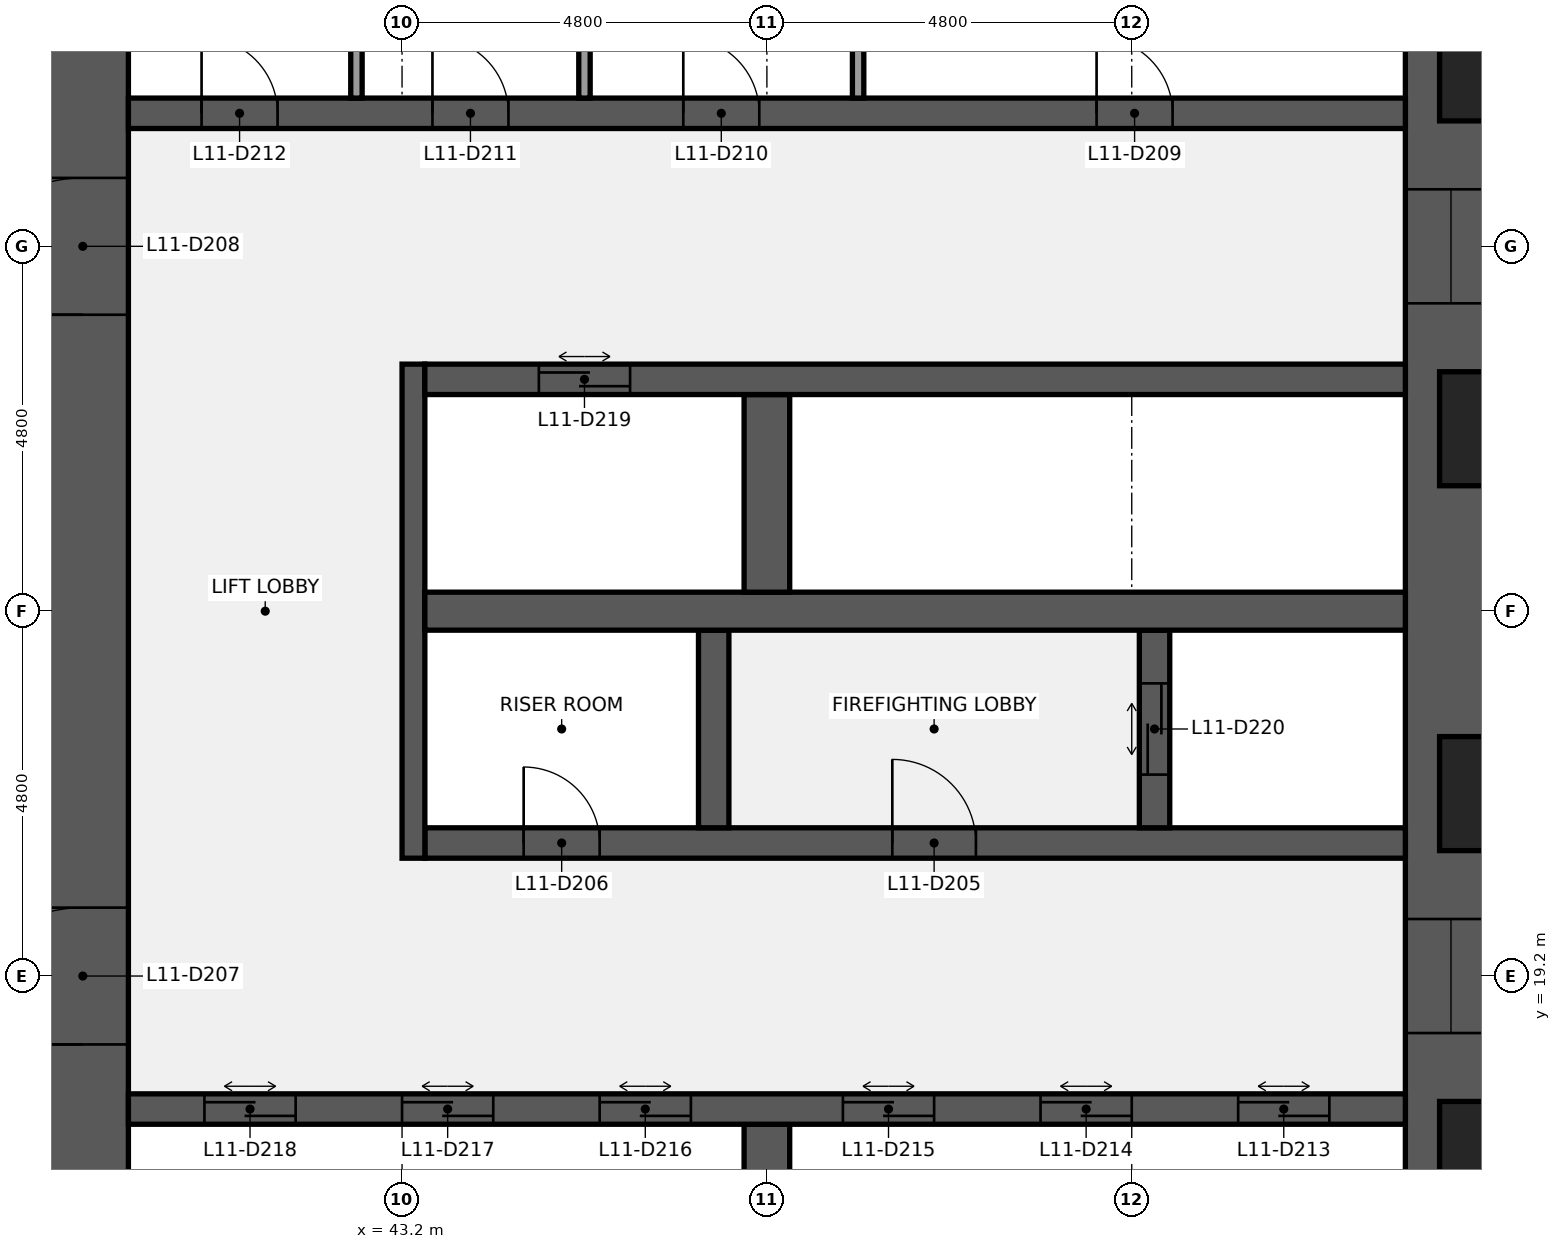
"""IFC4 building model, lengths in metres.
Left out: names, types, materials, properties, quantities, classifications, styles, units other than length and angle.
Written with IfcOpenShell. Run it as: python <this file> out.ifc"""

import sys

from ifc_helpers import new_model, si_unit, direction, frame, frame_2d, origin, place, context, subcontext, project, spatial, rectangle, extrude, element, fill, save


model = new_model("IFC4")
c1 = context("Model", 3, precision=1e-05, world=origin(), true_north=direction((0.0, 1.0)))
c2 = subcontext(c1, "Body", "Model", "MODEL_VIEW")
j1 = project(units=[si_unit("LENGTHUNIT", "METRE"), si_unit("PLANEANGLEUNIT", "RADIAN")], contexts=[c1])
p1 = place(None, origin())
s1 = spatial("IfcSite", under=j1, at=p1, CompositionType="ELEMENT")
p2 = place(p1, origin())
s2 = spatial("IfcBuilding", under=s1, at=p2, CompositionType="ELEMENT")
p3 = place(p2, frame((0.0, 0.0, 55.0)))
s3 = spatial("IfcBuildingStorey", under=s2, at=p3, CompositionType="ELEMENT", Elevation=55.0)
p4 = place(p3, frame((57.0, 38.4, 0.0), z_axis=(0.0, 0.0, 1.0), x_axis=(0.0, -1.0, 0.0)))
e1 = element("IfcWall", 1, at=p4, inside=s3, PredefinedType="SHEAR", context=c2, shape_type="SweptSolid", body=[
    extrude(rectangle(XDim=28.8, YDim=1.2, at=frame_2d((14.4, 0.0))), origin(), (0.0, 0.0, 1.0), 3.84),
])
p5 = place(p4, frame((18.45, 0.0, 0.9)))
e2 = element("IfcOpeningElement", 2, at=p5, cuts=e1, PredefinedType="OPENING", context=c2, shape_type="SweptSolid", body=[
    extrude(rectangle(XDim=1.5, YDim=1.5, at=frame_2d((0.75, 0.75))), frame((0.0, 0.61, 0.0), z_axis=(0.0, -1.0, 0.0), x_axis=(1.0, 0.0, 0.0)), (0.0, 0.0, 1.0), 1.22),
])
p6 = place(p4, frame((8.85, 0.0, 0.9)))
e3 = element("IfcOpeningElement", 3, at=p6, cuts=e1, PredefinedType="OPENING", context=c2, shape_type="SweptSolid", body=[
    extrude(rectangle(XDim=1.5, YDim=1.5, at=frame_2d((0.75, 0.75))), frame((0.0, 0.61, 0.0), z_axis=(0.0, -1.0, 0.0), x_axis=(1.0, 0.0, 0.0)), (0.0, 0.0, 1.0), 1.22),
])
p7 = place(p3, frame((39.0, 9.6, 0.0), z_axis=(0.0, 0.0, 1.0), x_axis=(0.0, 1.0, 0.0)))
e4 = element("IfcWall", 4, at=p7, inside=s3, PredefinedType="SHEAR", context=c2, shape_type="SweptSolid", body=[
    extrude(rectangle(XDim=28.8, YDim=1.2, at=frame_2d((14.4, 0.0))), origin(), (0.0, 0.0, 1.0), 3.84),
])
p8 = place(p7, frame((8.7, 0.0, 0.0)))
e5 = element("IfcOpeningElement", 5, at=p8, cuts=e4, PredefinedType="OPENING", context=c2, shape_type="SweptSolid", body=[
    extrude(rectangle(XDim=1.8, YDim=2.1, at=frame_2d((0.9, 1.05))), frame((0.0, 0.61, 0.0), z_axis=(0.0, -1.0, 0.0), x_axis=(1.0, 0.0, 0.0)), (0.0, 0.0, 1.0), 1.22),
])
p9 = place(p7, frame((18.3, 0.0, 0.0)))
e6 = element("IfcOpeningElement", 6, at=p9, cuts=e4, PredefinedType="OPENING", context=c2, shape_type="SweptSolid", body=[
    extrude(rectangle(XDim=1.8, YDim=2.1, at=frame_2d((0.9, 1.05))), frame((0.0, 0.61, 0.0), z_axis=(0.0, -1.0, 0.0), x_axis=(1.0, 0.0, 0.0)), (0.0, 0.0, 1.0), 1.22),
])
p10 = place(p3, frame((48.0, 14.65, 0.0), z_axis=(0.0, 0.0, 1.0), x_axis=(0.0, 1.0, 0.0)))
e7 = element("IfcWall", 7, at=p10, inside=s3, PredefinedType="SHEAR", context=c2, shape_type="SweptSolid", body=[
    extrude(rectangle(XDim=2.6, YDim=0.6, at=frame_2d((1.3, 0.0))), origin(), (0.0, 0.0, 1.0), 3.84),
])
p11 = place(p3, frame((39.6, 17.45, 0.0), z_axis=(0.0, 0.0, 1.0), x_axis=(1.0, 0.0, 0.0)))
e8 = element("IfcWall", 8, at=p11, inside=s3, PredefinedType="SHEAR", context=c2, shape_type="SweptSolid", body=[
    extrude(rectangle(XDim=16.8, YDim=0.4, at=frame_2d((8.4, 0.0))), origin(), (0.0, 0.0, 1.0), 3.84),
])
p12 = place(p11, frame((14.6, 0.0, 0.0)))
e9 = element("IfcOpeningElement", 9, at=p12, cuts=e8, PredefinedType="OPENING", context=c2, shape_type="SweptSolid", body=[
    extrude(rectangle(XDim=1.2, YDim=2.1, at=frame_2d((0.6, 1.05))), frame((0.0, 0.21, 0.0), z_axis=(0.0, -1.0, 0.0), x_axis=(1.0, 0.0, 0.0)), (0.0, 0.0, 1.0), 0.42),
])
p13 = place(p11, frame((12.0, 0.0, 0.0)))
e10 = element("IfcOpeningElement", 10, at=p13, cuts=e8, PredefinedType="OPENING", context=c2, shape_type="SweptSolid", body=[
    extrude(rectangle(XDim=1.2, YDim=2.1, at=frame_2d((0.6, 1.05))), frame((0.0, 0.21, 0.0), z_axis=(0.0, -1.0, 0.0), x_axis=(1.0, 0.0, 0.0)), (0.0, 0.0, 1.0), 0.42),
])
p14 = place(p11, frame((9.4, 0.0, 0.0)))
e11 = element("IfcOpeningElement", 11, at=p14, cuts=e8, PredefinedType="OPENING", context=c2, shape_type="SweptSolid", body=[
    extrude(rectangle(XDim=1.2, YDim=2.1, at=frame_2d((0.6, 1.05))), frame((0.0, 0.21, 0.0), z_axis=(0.0, -1.0, 0.0), x_axis=(1.0, 0.0, 0.0)), (0.0, 0.0, 1.0), 0.42),
])
p15 = place(p11, frame((6.2, 0.0, 0.0)))
e12 = element("IfcOpeningElement", 12, at=p15, cuts=e8, PredefinedType="OPENING", context=c2, shape_type="SweptSolid", body=[
    extrude(rectangle(XDim=1.2, YDim=2.1, at=frame_2d((0.6, 1.05))), frame((0.0, 0.21, 0.0), z_axis=(0.0, -1.0, 0.0), x_axis=(1.0, 0.0, 0.0)), (0.0, 0.0, 1.0), 0.42),
])
p16 = place(p11, frame((3.6, 0.0, 0.0)))
e13 = element("IfcOpeningElement", 13, at=p16, cuts=e8, PredefinedType="OPENING", context=c2, shape_type="SweptSolid", body=[
    extrude(rectangle(XDim=1.2, YDim=2.1, at=frame_2d((0.6, 1.05))), frame((0.0, 0.21, 0.0), z_axis=(0.0, -1.0, 0.0), x_axis=(1.0, 0.0, 0.0)), (0.0, 0.0, 1.0), 0.42),
])
p17 = place(p11, frame((1.0, 0.0, 0.0)))
e14 = element("IfcOpeningElement", 14, at=p17, cuts=e8, PredefinedType="OPENING", context=c2, shape_type="SweptSolid", body=[
    extrude(rectangle(XDim=1.2, YDim=2.1, at=frame_2d((0.6, 1.05))), frame((0.0, 0.21, 0.0), z_axis=(0.0, -1.0, 0.0), x_axis=(1.0, 0.0, 0.0)), (0.0, 0.0, 1.0), 0.42),
])
p18 = place(p3, frame((43.5, 20.95, 0.0), z_axis=(0.0, 0.0, 1.0), x_axis=(1.0, 0.0, 0.0)))
e15 = element("IfcWall", 15, at=p18, inside=s3, PredefinedType="SHEAR", context=c2, shape_type="SweptSolid", body=[
    extrude(rectangle(XDim=12.9, YDim=0.4, at=frame_2d((6.45, 0.0))), origin(), (0.0, 0.0, 1.0), 3.84),
])
p19 = place(p18, frame((6.15, 0.0, 0.0)))
e16 = element("IfcOpeningElement", 16, at=p19, cuts=e15, PredefinedType="OPENING", context=c2, shape_type="SweptSolid", body=[
    extrude(rectangle(XDim=1.1, YDim=2.1, at=frame_2d((0.55, 1.05))), frame((0.0, 0.21, 0.0), z_axis=(0.0, -1.0, 0.0), x_axis=(1.0, 0.0, 0.0)), (0.0, 0.0, 1.0), 0.42),
])
p20 = place(p18, frame((1.3, 0.0, 0.0)))
e17 = element("IfcOpeningElement", 17, at=p20, cuts=e15, PredefinedType="OPENING", context=c2, shape_type="SweptSolid", body=[
    extrude(rectangle(XDim=1.0, YDim=2.1, at=frame_2d((0.5, 1.05))), frame((0.0, 0.21, 0.0), z_axis=(0.0, -1.0, 0.0), x_axis=(1.0, 0.0, 0.0)), (0.0, 0.0, 1.0), 0.42),
])
p21 = place(p3, frame((43.35, 20.75, 0.0), z_axis=(0.0, 0.0, 1.0), x_axis=(0.0, 1.0, 0.0)))
e18 = element("IfcWall", 18, at=p21, inside=s3, PredefinedType="SHEAR", context=c2, shape_type="SweptSolid", body=[
    extrude(rectangle(XDim=6.5, YDim=0.3, at=frame_2d((3.25, 0.0))), origin(), (0.0, 0.0, 1.0), 3.84),
])
p22 = place(p3, frame((53.1, 21.15, 0.0), z_axis=(0.0, 0.0, 1.0), x_axis=(0.0, 1.0, 0.0)))
e19 = element("IfcWall", 19, at=p22, inside=s3, PredefinedType="SHEAR", context=c2, shape_type="SweptSolid", body=[
    extrude(rectangle(XDim=2.6, YDim=0.4, at=frame_2d((1.3, 0.0))), origin(), (0.0, 0.0, 1.0), 3.84),
])
p23 = place(p22, frame((0.7, 0.0, 0.0)))
e20 = element("IfcOpeningElement", 20, at=p23, cuts=e19, PredefinedType="OPENING", context=c2, shape_type="SweptSolid", body=[
    extrude(rectangle(XDim=1.2, YDim=2.1, at=frame_2d((0.6, 1.05))), frame((0.0, 0.21, 0.0), z_axis=(0.0, -1.0, 0.0), x_axis=(1.0, 0.0, 0.0)), (0.0, 0.0, 1.0), 0.42),
])
p24 = place(p3, frame((47.3, 21.15, 0.0), z_axis=(0.0, 0.0, 1.0), x_axis=(0.0, 1.0, 0.0)))
e21 = element("IfcWall", 21, at=p24, inside=s3, PredefinedType="SHEAR", context=c2, shape_type="SweptSolid", body=[
    extrude(rectangle(XDim=2.6, YDim=0.4, at=frame_2d((1.3, 0.0))), origin(), (0.0, 0.0, 1.0), 3.84),
])
p25 = place(p3, frame((43.5, 24.0, 0.0), z_axis=(0.0, 0.0, 1.0), x_axis=(1.0, 0.0, 0.0)))
e22 = element("IfcWall", 22, at=p25, inside=s3, PredefinedType="SHEAR", context=c2, shape_type="SweptSolid", body=[
    extrude(rectangle(XDim=12.9, YDim=0.5, at=frame_2d((6.45, 0.0))), origin(), (0.0, 0.0, 1.0), 3.84),
])
p26 = place(p3, frame((48.0, 24.25, 0.0), z_axis=(0.0, 0.0, 1.0), x_axis=(0.0, 1.0, 0.0)))
e23 = element("IfcWall", 23, at=p26, inside=s3, PredefinedType="SHEAR", context=c2, shape_type="SweptSolid", body=[
    extrude(rectangle(XDim=2.6, YDim=0.6, at=frame_2d((1.3, 0.0))), origin(), (0.0, 0.0, 1.0), 3.84),
])
p27 = place(p3, frame((43.5, 27.05, 0.0), z_axis=(0.0, 0.0, 1.0), x_axis=(1.0, 0.0, 0.0)))
e24 = element("IfcWall", 24, at=p27, inside=s3, PredefinedType="SHEAR", context=c2, shape_type="SweptSolid", body=[
    extrude(rectangle(XDim=12.9, YDim=0.4, at=frame_2d((6.45, 0.0))), origin(), (0.0, 0.0, 1.0), 3.84),
])
p28 = place(p27, frame((1.5, 0.0, 0.0)))
e25 = element("IfcOpeningElement", 25, at=p28, cuts=e24, PredefinedType="OPENING", context=c2, shape_type="SweptSolid", body=[
    extrude(rectangle(XDim=1.2, YDim=2.1, at=frame_2d((0.6, 1.05))), frame((0.0, 0.21, 0.0), z_axis=(0.0, -1.0, 0.0), x_axis=(1.0, 0.0, 0.0)), (0.0, 0.0, 1.0), 0.42),
])
p29 = place(p3, frame((39.6, 30.55, 0.0), z_axis=(0.0, 0.0, 1.0), x_axis=(1.0, 0.0, 0.0)))
e26 = element("IfcWall", 26, at=p29, inside=s3, PredefinedType="SHEAR", context=c2, shape_type="SweptSolid", body=[
    extrude(rectangle(XDim=16.8, YDim=0.4, at=frame_2d((8.4, 0.0))), origin(), (0.0, 0.0, 1.0), 3.84),
])
p30 = place(p29, frame((12.738, 0.0, 0.0)))
e27 = element("IfcOpeningElement", 27, at=p30, cuts=e26, PredefinedType="OPENING", context=c2, shape_type="SweptSolid", body=[
    extrude(rectangle(XDim=1.0, YDim=2.1, at=frame_2d((0.5, 1.05))), frame((0.0, 0.21, 0.0), z_axis=(0.0, -1.0, 0.0), x_axis=(1.0, 0.0, 0.0)), (0.0, 0.0, 1.0), 0.42),
])
p31 = place(p29, frame((7.3, 0.0, 0.0)))
e28 = element("IfcOpeningElement", 28, at=p31, cuts=e26, PredefinedType="OPENING", context=c2, shape_type="SweptSolid", body=[
    extrude(rectangle(XDim=1.0, YDim=2.1, at=frame_2d((0.5, 1.05))), frame((0.0, 0.21, 0.0), z_axis=(0.0, -1.0, 0.0), x_axis=(1.0, 0.0, 0.0)), (0.0, 0.0, 1.0), 0.42),
])
p32 = place(p29, frame((4.0, 0.0, 0.0)))
e29 = element("IfcOpeningElement", 29, at=p32, cuts=e26, PredefinedType="OPENING", context=c2, shape_type="SweptSolid", body=[
    extrude(rectangle(XDim=1.0, YDim=2.1, at=frame_2d((0.5, 1.05))), frame((0.0, 0.21, 0.0), z_axis=(0.0, -1.0, 0.0), x_axis=(1.0, 0.0, 0.0)), (0.0, 0.0, 1.0), 0.42),
])
p33 = place(p29, frame((0.962, 0.0, 0.0)))
e30 = element("IfcOpeningElement", 30, at=p33, cuts=e26, PredefinedType="OPENING", context=c2, shape_type="SweptSolid", body=[
    extrude(rectangle(XDim=1.0, YDim=2.1, at=frame_2d((0.5, 1.05))), frame((0.0, 0.21, 0.0), z_axis=(0.0, -1.0, 0.0), x_axis=(1.0, 0.0, 0.0)), (0.0, 0.0, 1.0), 0.42),
])
for number, where, z_axis, x_axis in (
    (31, (49.2, 30.75, 0.0), (0.0, 0.0, 1.0), (0.0, 1.0, 0.0)),
    (32, (45.6, 30.75, 0.0), (0.0, 0.0, 1.0), (0.0, 1.0, 0.0)),
    (33, (42.6, 30.75, 0.0), (0.0, 0.0, 1.0), (0.0, 1.0, 0.0)),
):
    element("IfcWall", number, at=place(p3, frame(where, z_axis=z_axis, x_axis=x_axis)), inside=s3, PredefinedType="PARTITIONING", context=c2, shape_type="SweptSolid", body=[
        extrude(rectangle(XDim=2.6, YDim=0.15, at=frame_2d((1.3, 0.0))), origin(), (0.0, 0.0, 1.0), 3.84),
    ])
p34 = place(p19, origin())
e34 = element("IfcDoor", 34, at=p34, inside=s3, OperationType="SINGLE_SWING_LEFT", PredefinedType="DOOR", context=c2, shape_type="SweptSolid", body=[
    extrude(rectangle(XDim=1.1, YDim=2.1, at=frame_2d((0.55, 1.05))), frame((0.0, 0.025, 0.0), z_axis=(0.0, -1.0, 0.0), x_axis=(1.0, 0.0, 0.0)), (0.0, 0.0, 1.0), 0.05),
])
fill(e16, e34)
p35 = place(p20, origin())
e35 = element("IfcDoor", 35, at=p35, inside=s3, OperationType="SINGLE_SWING_LEFT", PredefinedType="DOOR", context=c2, shape_type="SweptSolid", body=[
    extrude(rectangle(XDim=1.0, YDim=2.1, at=frame_2d((0.5, 1.05))), frame((0.0, 0.025, 0.0), z_axis=(0.0, -1.0, 0.0), x_axis=(1.0, 0.0, 0.0)), (0.0, 0.0, 1.0), 0.05),
])
fill(e17, e35)
p36 = place(p8, origin())
e36 = element("IfcDoor", 36, at=p36, inside=s3, OperationType="DOUBLE_DOOR_SINGLE_SWING", PredefinedType="DOOR", context=c2, shape_type="SweptSolid", body=[
    extrude(rectangle(XDim=1.8, YDim=2.1, at=frame_2d((0.9, 1.05))), frame((0.0, 0.025, 0.0), z_axis=(0.0, -1.0, 0.0), x_axis=(1.0, 0.0, 0.0)), (0.0, 0.0, 1.0), 0.05),
])
fill(e5, e36)
p37 = place(p9, origin())
e37 = element("IfcDoor", 37, at=p37, inside=s3, OperationType="DOUBLE_DOOR_SINGLE_SWING", PredefinedType="DOOR", context=c2, shape_type="SweptSolid", body=[
    extrude(rectangle(XDim=1.8, YDim=2.1, at=frame_2d((0.9, 1.05))), frame((0.0, 0.025, 0.0), z_axis=(0.0, -1.0, 0.0), x_axis=(1.0, 0.0, 0.0)), (0.0, 0.0, 1.0), 0.05),
])
fill(e6, e37)
p38 = place(p30, origin())
e38 = element("IfcDoor", 38, at=p38, inside=s3, OperationType="SINGLE_SWING_LEFT", PredefinedType="DOOR", context=c2, shape_type="SweptSolid", body=[
    extrude(rectangle(XDim=1.0, YDim=2.1, at=frame_2d((0.5, 1.05))), frame((0.0, 0.025, 0.0), z_axis=(0.0, -1.0, 0.0), x_axis=(1.0, 0.0, 0.0)), (0.0, 0.0, 1.0), 0.05),
])
fill(e27, e38)
p39 = place(p31, origin())
e39 = element("IfcDoor", 39, at=p39, inside=s3, OperationType="SINGLE_SWING_LEFT", PredefinedType="DOOR", context=c2, shape_type="SweptSolid", body=[
    extrude(rectangle(XDim=1.0, YDim=2.1, at=frame_2d((0.5, 1.05))), frame((0.0, 0.025, 0.0), z_axis=(0.0, -1.0, 0.0), x_axis=(1.0, 0.0, 0.0)), (0.0, 0.0, 1.0), 0.05),
])
fill(e28, e39)
p40 = place(p32, origin())
e40 = element("IfcDoor", 40, at=p40, inside=s3, OperationType="SINGLE_SWING_LEFT", PredefinedType="DOOR", context=c2, shape_type="SweptSolid", body=[
    extrude(rectangle(XDim=1.0, YDim=2.1, at=frame_2d((0.5, 1.05))), frame((0.0, 0.025, 0.0), z_axis=(0.0, -1.0, 0.0), x_axis=(1.0, 0.0, 0.0)), (0.0, 0.0, 1.0), 0.05),
])
fill(e29, e40)
p41 = place(p33, origin())
e41 = element("IfcDoor", 41, at=p41, inside=s3, OperationType="SINGLE_SWING_LEFT", PredefinedType="DOOR", context=c2, shape_type="SweptSolid", body=[
    extrude(rectangle(XDim=1.0, YDim=2.1, at=frame_2d((0.5, 1.05))), frame((0.0, 0.025, 0.0), z_axis=(0.0, -1.0, 0.0), x_axis=(1.0, 0.0, 0.0)), (0.0, 0.0, 1.0), 0.05),
])
fill(e30, e41)
p42 = place(p12, origin())
e42 = element("IfcDoor", 42, at=p42, inside=s3, OperationType="DOUBLE_DOOR_SLIDING", PredefinedType="DOOR", context=c2, shape_type="SweptSolid", body=[
    extrude(rectangle(XDim=1.2, YDim=2.1, at=frame_2d((0.6, 1.05))), frame((0.0, 0.025, 0.0), z_axis=(0.0, -1.0, 0.0), x_axis=(1.0, 0.0, 0.0)), (0.0, 0.0, 1.0), 0.05),
])
fill(e9, e42)
p43 = place(p13, origin())
e43 = element("IfcDoor", 43, at=p43, inside=s3, OperationType="DOUBLE_DOOR_SLIDING", PredefinedType="DOOR", context=c2, shape_type="SweptSolid", body=[
    extrude(rectangle(XDim=1.2, YDim=2.1, at=frame_2d((0.6, 1.05))), frame((0.0, 0.025, 0.0), z_axis=(0.0, -1.0, 0.0), x_axis=(1.0, 0.0, 0.0)), (0.0, 0.0, 1.0), 0.05),
])
fill(e10, e43)
p44 = place(p14, origin())
e44 = element("IfcDoor", 44, at=p44, inside=s3, OperationType="DOUBLE_DOOR_SLIDING", PredefinedType="DOOR", context=c2, shape_type="SweptSolid", body=[
    extrude(rectangle(XDim=1.2, YDim=2.1, at=frame_2d((0.6, 1.05))), frame((0.0, 0.025, 0.0), z_axis=(0.0, -1.0, 0.0), x_axis=(1.0, 0.0, 0.0)), (0.0, 0.0, 1.0), 0.05),
])
fill(e11, e44)
p45 = place(p15, origin())
e45 = element("IfcDoor", 45, at=p45, inside=s3, OperationType="DOUBLE_DOOR_SLIDING", PredefinedType="DOOR", context=c2, shape_type="SweptSolid", body=[
    extrude(rectangle(XDim=1.2, YDim=2.1, at=frame_2d((0.6, 1.05))), frame((0.0, 0.025, 0.0), z_axis=(0.0, -1.0, 0.0), x_axis=(1.0, 0.0, 0.0)), (0.0, 0.0, 1.0), 0.05),
])
fill(e12, e45)
p46 = place(p16, origin())
e46 = element("IfcDoor", 46, at=p46, inside=s3, OperationType="DOUBLE_DOOR_SLIDING", PredefinedType="DOOR", context=c2, shape_type="SweptSolid", body=[
    extrude(rectangle(XDim=1.2, YDim=2.1, at=frame_2d((0.6, 1.05))), frame((0.0, 0.025, 0.0), z_axis=(0.0, -1.0, 0.0), x_axis=(1.0, 0.0, 0.0)), (0.0, 0.0, 1.0), 0.05),
])
fill(e13, e46)
p47 = place(p17, origin())
e47 = element("IfcDoor", 47, at=p47, inside=s3, OperationType="DOUBLE_DOOR_SLIDING", PredefinedType="DOOR", context=c2, shape_type="SweptSolid", body=[
    extrude(rectangle(XDim=1.2, YDim=2.1, at=frame_2d((0.6, 1.05))), frame((0.0, 0.025, 0.0), z_axis=(0.0, -1.0, 0.0), x_axis=(1.0, 0.0, 0.0)), (0.0, 0.0, 1.0), 0.05),
])
fill(e14, e47)
p48 = place(p28, origin())
e48 = element("IfcDoor", 48, at=p48, inside=s3, OperationType="DOUBLE_DOOR_SLIDING", PredefinedType="DOOR", context=c2, shape_type="SweptSolid", body=[
    extrude(rectangle(XDim=1.2, YDim=2.1, at=frame_2d((0.6, 1.05))), frame((0.0, 0.025, 0.0), z_axis=(0.0, -1.0, 0.0), x_axis=(1.0, 0.0, 0.0)), (0.0, 0.0, 1.0), 0.05),
])
fill(e25, e48)
p49 = place(p23, origin())
e49 = element("IfcDoor", 49, at=p49, inside=s3, OperationType="DOUBLE_DOOR_SLIDING", PredefinedType="DOOR", context=c2, shape_type="SweptSolid", body=[
    extrude(rectangle(XDim=1.2, YDim=2.1, at=frame_2d((0.6, 1.05))), frame((0.0, 0.025, 0.0), z_axis=(0.0, -1.0, 0.0), x_axis=(1.0, 0.0, 0.0)), (0.0, 0.0, 1.0), 0.05),
])
fill(e20, e49)
p50 = place(p5, origin())
e50 = element("IfcWindow", 50, at=p50, inside=s3, PartitioningType="SINGLE_PANEL", PredefinedType="WINDOW", context=c2, shape_type="SweptSolid", body=[
    extrude(rectangle(XDim=1.5, YDim=1.5, at=frame_2d((0.75, 0.75))), frame((0.0, 0.03, 0.0), z_axis=(0.0, -1.0, 0.0), x_axis=(1.0, 0.0, 0.0)), (0.0, 0.0, 1.0), 0.06),
])
fill(e2, e50)
p51 = place(p6, origin())
e51 = element("IfcWindow", 51, at=p51, inside=s3, PartitioningType="SINGLE_PANEL", PredefinedType="WINDOW", context=c2, shape_type="SweptSolid", body=[
    extrude(rectangle(XDim=1.5, YDim=1.5, at=frame_2d((0.75, 0.75))), frame((0.0, 0.03, 0.0), z_axis=(0.0, -1.0, 0.0), x_axis=(1.0, 0.0, 0.0)), (0.0, 0.0, 1.0), 0.06),
])
fill(e3, e51)
save(model, sys.argv[1])
